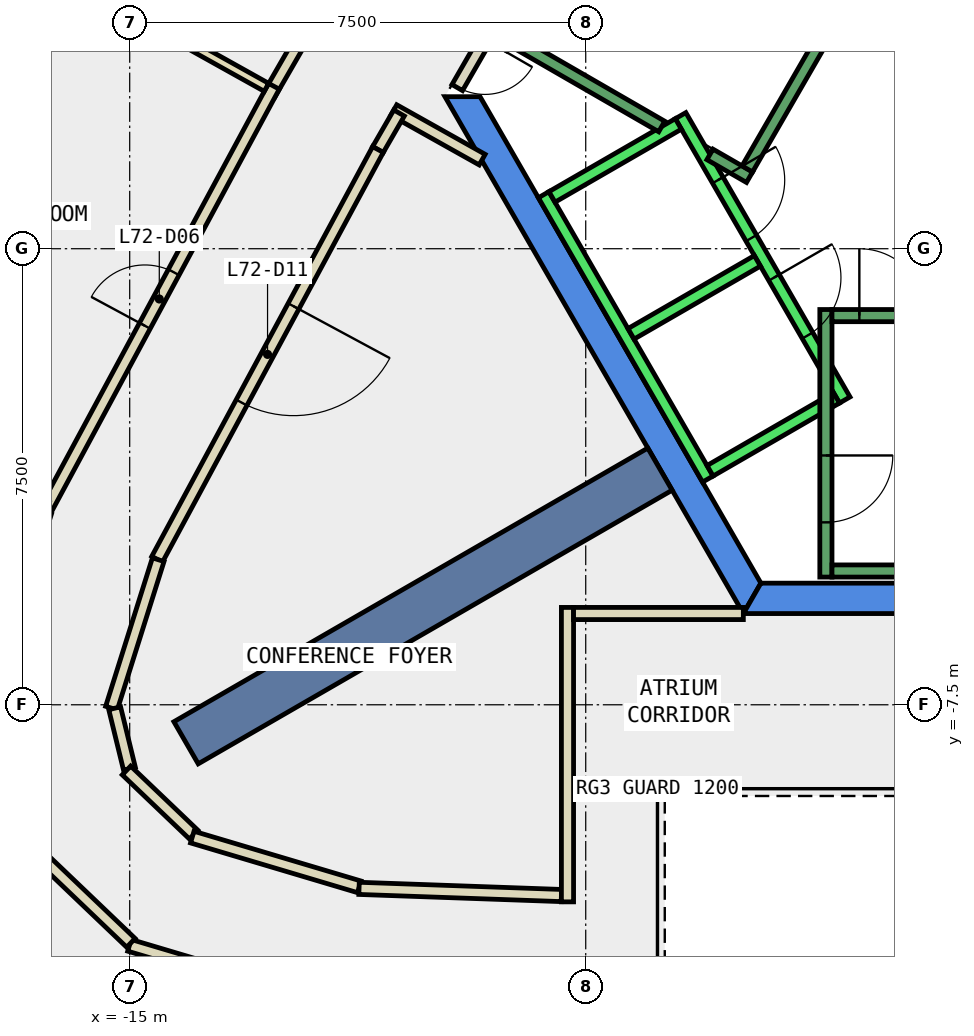
"""IFC4 building model, lengths in metres.
Left out: names, types, materials, properties, quantities, classifications, styles, units other than length and angle.
Written with IfcOpenShell. Run it as: python <this file> out.ifc"""

import sys

from ifc_helpers import new_model, si_unit, direction, frame, frame_2d, origin, place, context, subcontext, project, spatial, polyline, rectangle, outline, extrude, element, fill, save


model = new_model("IFC4")
c1 = context("Model", 3, precision=1e-05, world=origin(), true_north=direction((0.0, 1.0)))
c2 = subcontext(c1, "Body", "Model", "MODEL_VIEW")
j1 = project(units=[si_unit("LENGTHUNIT", "METRE"), si_unit("PLANEANGLEUNIT", "RADIAN")], contexts=[c1])
p1 = place(None, origin())
s1 = spatial("IfcSite", under=j1, at=p1, CompositionType="ELEMENT")
p2 = place(p1, origin())
s2 = spatial("IfcBuilding", under=s1, at=p2, CompositionType="ELEMENT")
p3 = place(p2, frame((0.0, 0.0, 308.0)))
s3 = spatial("IfcBuildingStorey", under=s2, at=p3, CompositionType="ELEMENT", Elevation=308.0)
p4 = place(p3, frame((0.0, 0.0, -0.34)))
e1 = element("IfcWall", 1, at=p4, inside=s3, PredefinedType="SHEAR", context=c2, shape_type="SweptSolid", body=[
    extrude(outline(polyline([(-9.815, 2.5), (-4.907, -6.0), (-4.619, -5.5), (-9.238, 2.5), (-9.815, 2.5)])), origin(), (0.0, 0.0, 1.0), 3.6),
])
p5 = place(p3, frame((0.0, 0.0, -0.34)))
e2 = element("IfcWall", 2, at=p5, inside=s3, PredefinedType="SHEAR", context=c2, shape_type="SweptSolid", body=[
    extrude(outline(polyline([(3.75, -6.0), (3.75, -5.5), (-4.619, -5.5), (-4.907, -6.0), (3.75, -6.0)])), origin(), (0.0, 0.0, 1.0), 3.6),
])
p6 = place(p3, frame((-6.279, -3.625, -0.34), z_axis=(0.0, 0.0, 1.0), x_axis=(-0.866017533419, -0.500013631625, 0.0)))
e3 = element("IfcWall", 3, at=p6, inside=s3, PredefinedType="SHEAR", context=c2, shape_type="SweptSolid", body=[
    extrude(rectangle(XDim=9.0, YDim=0.8, at=frame_2d((4.5, 0.0))), origin(), (0.0, 0.0, 1.0), 3.6),
])
p7 = place(p3, frame((-9.203, 1.465, 0.0), z_axis=(0.0, 0.0, 1.0), x_axis=(-0.872341127106, 0.488897696823, 0.0)))
e4 = element("IfcWall", 4, at=p7, inside=s3, PredefinedType="PARTITIONING", context=c2, shape_type="SweptSolid", body=[
    extrude(rectangle(XDim=1.667, YDim=0.2, at=frame_2d((0.833, 0.0))), origin(), (0.0, 0.0, 1.0), 3.26),
])
p8 = place(p3, frame((-10.57, 2.232, 0.0), z_axis=(0.0, 0.0, 1.0), x_axis=(-0.500037208726, -0.86600392025, 0.0)))
e5 = element("IfcWall", 5, at=p8, inside=s3, PredefinedType="PARTITIONING", context=c2, shape_type="SweptSolid", body=[
    extrude(rectangle(XDim=0.694, YDim=0.2, at=frame_2d((0.347, 0.0))), origin(), (0.0, 0.0, 1.0), 3.26),
])
p9 = place(p3, frame((-10.917, 1.631, 0.0), z_axis=(0.0, 0.0, 1.0), x_axis=(-0.47449538478, -0.880257990491, 0.0)))
e6 = element("IfcWall", 6, at=p9, inside=s3, PredefinedType="PARTITIONING", context=c2, shape_type="SweptSolid", body=[
    extrude(rectangle(XDim=7.655, YDim=0.2, at=frame_2d((3.827, 0.0))), origin(), (0.0, 0.0, 1.0), 3.26),
])
p10 = place(p9, frame((2.927, 0.0, 0.0)))
e7 = element("IfcOpeningElement", 7, at=p10, cuts=e6, PredefinedType="OPENING", context=c2, shape_type="SweptSolid", body=[
    extrude(rectangle(XDim=1.8, YDim=2.1, at=frame_2d((0.9, 1.05))), frame((0.0, 0.11, 0.0), z_axis=(0.0, -1.0, 0.0), x_axis=(1.0, 0.0, 0.0)), (0.0, 0.0, 1.0), 0.22),
])
p11 = place(p3, frame((-14.531, -5.114, 0.0), z_axis=(0.0, 0.0, 1.0), x_axis=(-0.300501248013, -0.953781421471, 0.0)))
e8 = element("IfcWall", 8, at=p11, inside=s3, PredefinedType="PARTITIONING", context=c2, shape_type="SweptSolid", body=[
    extrude(rectangle(XDim=2.559, YDim=0.2, at=frame_2d((1.28, 0.0))), origin(), (0.0, 0.0, 1.0), 3.26),
])
p12 = place(p3, frame((-15.247, -7.557, 0.0), z_axis=(0.0, 0.0, 1.0), x_axis=(0.237373129266, -0.971418549083, 0.0)))
e9 = element("IfcWall", 9, at=p12, inside=s3, PredefinedType="PARTITIONING", context=c2, shape_type="SweptSolid", body=[
    extrude(rectangle(XDim=1.024, YDim=0.2, at=frame_2d((0.512, 0.0))), origin(), (0.0, 0.0, 1.0), 3.26),
])
p13 = place(p3, frame((-15.053, -8.58, 0.0), z_axis=(0.0, 0.0, 1.0), x_axis=(0.723283043556, -0.690551691696, 0.0)))
e10 = element("IfcWall", 10, at=p13, inside=s3, PredefinedType="PARTITIONING", context=c2, shape_type="SweptSolid", body=[
    extrude(rectangle(XDim=1.529, YDim=0.2, at=frame_2d((0.765, 0.0))), origin(), (0.0, 0.0, 1.0), 3.26),
])
p14 = place(p3, frame((-13.971, -9.676, 0.0), z_axis=(0.0, 0.0, 1.0), x_axis=(0.958417413979, -0.285370041492, 0.0)))
e11 = element("IfcWall", 11, at=p14, inside=s3, PredefinedType="PARTITIONING", context=c2, shape_type="SweptSolid", body=[
    extrude(rectangle(XDim=2.866, YDim=0.2, at=frame_2d((1.433, 0.0))), origin(), (0.0, 0.0, 1.0), 3.26),
])
p15 = place(p3, frame((-11.228, -10.519, 0.0), z_axis=(0.0, 0.0, 1.0), x_axis=(0.999372900517, -0.035409119054, 0.0)))
e12 = element("IfcWall", 12, at=p15, inside=s3, PredefinedType="PARTITIONING", context=c2, shape_type="SweptSolid", body=[
    extrude(rectangle(XDim=3.33, YDim=0.2, at=frame_2d((1.665, 0.0))), origin(), (0.0, 0.0, 1.0), 3.26),
])
p16 = place(p3, frame((-12.701, 2.54, 0.0), z_axis=(0.0, 0.0, 1.0), x_axis=(0.499946799636, 0.86605611685, 0.0)))
e13 = element("IfcWall", 13, at=p16, inside=s3, PredefinedType="PARTITIONING", context=c2, shape_type="SweptSolid", body=[
    extrude(rectangle(XDim=8.227, YDim=0.2, at=frame_2d((4.114, 0.0))), origin(), (0.0, 0.0, 1.0), 3.26),
])
p17 = place(p16, frame((3.613, 0.0, 0.0)))
e14 = element("IfcOpeningElement", 14, at=p17, cuts=e13, PredefinedType="OPENING", context=c2, shape_type="SweptSolid", body=[
    extrude(rectangle(XDim=1.0, YDim=2.1, at=frame_2d((0.5, 1.05))), frame((0.0, 0.11, 0.0), z_axis=(0.0, -1.0, 0.0), x_axis=(1.0, 0.0, 0.0)), (0.0, 0.0, 1.0), 0.22),
])
p18 = place(p3, frame((-16.399, -4.325, 0.0), z_axis=(0.0, 0.0, 1.0), x_axis=(0.474489967676, 0.880260910512, 0.0)))
e15 = element("IfcWall", 15, at=p18, inside=s3, PredefinedType="PARTITIONING", context=c2, shape_type="SweptSolid", body=[
    extrude(rectangle(XDim=7.948, YDim=0.2, at=frame_2d((3.974, 0.0))), origin(), (0.0, 0.0, 1.0), 3.26),
])
p19 = place(p18, frame((3.474, 0.0, 0.0)))
e16 = element("IfcOpeningElement", 16, at=p19, cuts=e15, PredefinedType="OPENING", context=c2, shape_type="SweptSolid", body=[
    extrude(rectangle(XDim=1.0, YDim=2.1, at=frame_2d((0.5, 1.05))), frame((0.0, 0.11, 0.0), z_axis=(0.0, -1.0, 0.0), x_axis=(1.0, 0.0, 0.0)), (0.0, 0.0, 1.0), 0.22),
])
p20 = place(p3, frame((-11.55, -12.484, 0.0), z_axis=(0.0, 0.0, 1.0), x_axis=(-0.958459796003, 0.285227662485, 0.0)))
e17 = element("IfcWall", 17, at=p20, inside=s3, PredefinedType="PARTITIONING", context=c2, shape_type="SweptSolid", body=[
    extrude(rectangle(XDim=3.604, YDim=0.2, at=frame_2d((1.802, 0.0))), origin(), (0.0, 0.0, 1.0), 3.26),
])
p21 = place(p3, frame((-14.98, -11.415, 0.0), z_axis=(0.0, 0.0, 1.0), x_axis=(-0.723099256445, 0.690744138831, 0.0)))
e18 = element("IfcWall", 18, at=p21, inside=s3, PredefinedType="PARTITIONING", context=c2, shape_type="SweptSolid", body=[
    extrude(rectangle(XDim=2.596, YDim=0.2, at=frame_2d((1.298, 0.0))), origin(), (0.0, 0.0, 1.0), 3.26),
])
p22 = place(p3, frame((-2.54, 5.1, 0.0), z_axis=(0.0, 0.0, 1.0), x_axis=(0.499925051871, -0.866068670783, 0.0)))
e19 = element("IfcWall", 19, at=p22, inside=s3, PredefinedType="PARTITIONING", context=c2, shape_type="SweptSolid", body=[
    extrude(rectangle(XDim=5.181, YDim=0.2, at=frame_2d((2.59, 0.0))), origin(), (0.0, 0.0, 1.0), 3.26),
])
p23 = place(p22, frame((1.64, 0.0, 0.0)))
e20 = element("IfcOpeningElement", 20, at=p23, cuts=e19, PredefinedType="OPENING", context=c2, shape_type="SweptSolid", body=[
    extrude(rectangle(XDim=1.0, YDim=2.1, at=frame_2d((0.5, 1.05))), frame((0.0, 0.11, 0.0), z_axis=(0.0, -1.0, 0.0), x_axis=(1.0, 0.0, 0.0)), (0.0, 0.0, 1.0), 0.22),
])
p24 = place(p3, frame((-7.8, -10.741, 0.0), z_axis=(0.0, 0.0, 1.0), x_axis=(0.0, 1.0, 0.0)))
e21 = element("IfcWall", 21, at=p24, inside=s3, PredefinedType="PARTITIONING", context=c2, shape_type="SweptSolid", body=[
    extrude(rectangle(XDim=4.842, YDim=0.2, at=frame_2d((2.421, 0.0))), origin(), (0.0, 0.0, 1.0), 3.26),
])
p25 = place(p3, frame((-7.7, -5.999, 0.0), z_axis=(0.0, 0.0, 1.0), x_axis=(1.0, 0.0, 0.0)))
e22 = element("IfcWall", 22, at=p25, inside=s3, PredefinedType="PARTITIONING", context=c2, shape_type="SweptSolid", body=[
    extrude(rectangle(XDim=2.792, YDim=0.2, at=frame_2d((1.396, 0.0))), origin(), (0.0, 0.0, 1.0), 3.26),
])
p26 = place(p3, frame((-12.751, 2.654, 0.0), z_axis=(0.0, 0.0, 1.0), x_axis=(-0.873277679945, 0.487222837837, 0.0)))
e23 = element("IfcWall", 23, at=p26, inside=s3, PredefinedType="PARTITIONING", context=c2, shape_type="SweptSolid", body=[
    extrude(rectangle(XDim=4.38, YDim=0.15, at=frame_2d((2.19, 0.0))), origin(), (0.0, 0.0, 1.0), 3.26),
])
p27 = place(p3, frame((-9.15, 3.452, 0.0), z_axis=(0.0, 0.0, 1.0), x_axis=(-0.500079945886, -0.865979242085, 0.0)))
e24 = element("IfcWall", 24, at=p27, inside=s3, PredefinedType="PARTITIONING", context=c2, shape_type="SweptSolid", body=[
    extrude(rectangle(XDim=0.926, YDim=0.2, at=frame_2d((0.463, 0.0))), origin(), (0.0, 0.0, 1.0), 2.4),
])
p28 = place(p27, frame((0.017, 0.0, 0.0)))
e25 = element("IfcOpeningElement", 25, at=p28, cuts=e24, PredefinedType="OPENING", context=c2, shape_type="SweptSolid", body=[
    extrude(rectangle(XDim=0.9, YDim=2.1, at=frame_2d((0.45, 1.05))), frame((0.0, 0.11, 0.0), z_axis=(0.0, -1.0, 0.0), x_axis=(1.0, 0.0, 0.0)), (0.0, 0.0, 1.0), 0.22),
])
p29 = place(p3, frame((-5.94, 2.188, 0.0), z_axis=(0.0, 0.0, 1.0), x_axis=(0.500034260056, -0.866005622828, 0.0)))
e26 = element("IfcWall", 26, at=p29, inside=s3, PredefinedType="STANDARD", context=c2, shape_type="SweptSolid", body=[
    extrude(rectangle(XDim=5.399, YDim=0.2, at=frame_2d((2.7, 0.0))), origin(), (0.0, 0.0, 1.0), 3.26),
])
p30 = place(p29, frame((3.075, 0.0, 0.0)))
e27 = element("IfcOpeningElement", 27, at=p30, cuts=e26, PredefinedType="OPENING", context=c2, shape_type="SweptSolid", body=[
    extrude(rectangle(XDim=1.1, YDim=2.1, at=frame_2d((0.55, 1.05))), frame((0.0, 0.11, 0.0), z_axis=(0.0, -1.0, 0.0), x_axis=(1.0, 0.0, 0.0)), (0.0, 0.0, 1.0), 0.22),
])
p31 = place(p29, frame((1.225, 0.0, 0.0)))
e28 = element("IfcOpeningElement", 28, at=p31, cuts=e26, PredefinedType="OPENING", context=c2, shape_type="SweptSolid", body=[
    extrude(rectangle(XDim=1.1, YDim=2.1, at=frame_2d((0.55, 1.05))), frame((0.0, 0.11, 0.0), z_axis=(0.0, -1.0, 0.0), x_axis=(1.0, 0.0, 0.0)), (0.0, 0.0, 1.0), 0.22),
])
p32 = place(p3, frame((-8.192, 0.888, 0.0), z_axis=(0.0, 0.0, 1.0), x_axis=(0.500034260056, -0.866005622828, 0.0)))
e29 = element("IfcWall", 29, at=p32, inside=s3, PredefinedType="STANDARD", context=c2, shape_type="SweptSolid", body=[
    extrude(rectangle(XDim=5.399, YDim=0.2, at=frame_2d((2.7, 0.0))), origin(), (0.0, 0.0, 1.0), 3.26),
])
for number, where, z_axis, x_axis in (
    (30, (-5.977, 2.052, 0.0), (0.0, 0.0, 1.0), (-0.866, -0.5, 0.0)),
    (31, (-4.677, -0.2, 0.0), (0.0, 0.0, 1.0), (-0.866, -0.5, 0.0)),
):
    element("IfcWall", number, at=place(p3, frame(where, z_axis=z_axis, x_axis=x_axis)), inside=s3, PredefinedType="STANDARD", context=c2, shape_type="SweptSolid", body=[
        extrude(rectangle(XDim=2.399, YDim=0.2, at=frame_2d((1.2, 0.0))), origin(), (0.0, 0.0, 1.0), 3.26),
    ])
p33 = place(p3, frame((-3.377, -2.452, 0.0), z_axis=(0.0, 0.0, 1.0), x_axis=(-0.865955154139, -0.50012165622, 0.0)))
e32 = element("IfcWall", 32, at=p33, inside=s3, PredefinedType="STANDARD", context=c2, shape_type="SweptSolid", body=[
    extrude(rectangle(XDim=2.4, YDim=0.2, at=frame_2d((1.2, 0.0))), origin(), (0.0, 0.0, 1.0), 3.26),
])
p34 = place(p3, frame((-3.55, -1.0, 0.0), z_axis=(0.0, 0.0, 1.0), x_axis=(0.0, -1.0, 0.0)))
e33 = element("IfcWall", 33, at=p34, inside=s3, PredefinedType="STANDARD", context=c2, shape_type="SweptSolid", body=[
    extrude(rectangle(XDim=4.4, YDim=0.2, at=frame_2d((2.2, 0.0))), origin(), (0.0, 0.0, 1.0), 3.26),
])
p35 = place(p34, frame((2.4, 0.0, 0.0)))
e34 = element("IfcOpeningElement", 34, at=p35, cuts=e33, PredefinedType="OPENING", context=c2, shape_type="SweptSolid", body=[
    extrude(rectangle(XDim=1.1, YDim=2.2, at=frame_2d((0.55, 1.1))), frame((0.0, 0.11, 0.0), z_axis=(0.0, -1.0, 0.0), x_axis=(1.0, 0.0, 0.0)), (0.0, 0.0, 1.0), 0.22),
])
p36 = place(p3, frame((-3.45, -1.1, 0.0), z_axis=(0.0, 0.0, 1.0), x_axis=(1.0, 0.0, 0.0)))
e35 = element("IfcWall", 35, at=p36, inside=s3, PredefinedType="STANDARD", context=c2, shape_type="SweptSolid", body=[
    extrude(rectangle(XDim=6.9, YDim=0.2, at=frame_2d((3.45, 0.0))), origin(), (0.0, 0.0, 1.0), 3.26),
])
p37 = place(p36, frame((0.45, 0.0, 0.0)))
e36 = element("IfcOpeningElement", 36, at=p37, cuts=e35, PredefinedType="OPENING", context=c2, shape_type="SweptSolid", body=[
    extrude(rectangle(XDim=1.1, YDim=2.2, at=frame_2d((0.55, 1.1))), frame((0.0, 0.11, 0.0), z_axis=(0.0, -1.0, 0.0), x_axis=(1.0, 0.0, 0.0)), (0.0, 0.0, 1.0), 0.22),
])
p38 = place(p3, frame((-3.45, -5.3, 0.0), z_axis=(0.0, 0.0, 1.0), x_axis=(1.0, 0.0, 0.0)))
e37 = element("IfcWall", 37, at=p38, inside=s3, PredefinedType="STANDARD", context=c2, shape_type="SweptSolid", body=[
    extrude(rectangle(XDim=6.9, YDim=0.2, at=frame_2d((3.45, 0.0))), origin(), (0.0, 0.0, 1.0), 3.26),
])
p39 = place(p3, frame((-6.25, 2.01, 0.0), z_axis=(0.0, 0.0, 1.0), x_axis=(-0.86611865017, 0.499838457731, 0.0)))
e38 = element("IfcWall", 38, at=p39, inside=s3, PredefinedType="STANDARD", context=c2, shape_type="SweptSolid", body=[
    extrude(rectangle(XDim=2.733, YDim=0.2, at=frame_2d((1.366, 0.0))), origin(), (0.0, 0.0, 1.0), 3.26),
])
p40 = place(p3, frame((-4.806, 1.176, 0.0), z_axis=(0.0, 0.0, 1.0), x_axis=(-0.866558586415, 0.499075361355, 0.0)))
e39 = element("IfcWall", 39, at=p40, inside=s3, PredefinedType="STANDARD", context=c2, shape_type="SweptSolid", body=[
    extrude(rectangle(XDim=0.751, YDim=0.2, at=frame_2d((0.376, 0.0))), origin(), (0.0, 0.0, 1.0), 3.26),
])
p41 = place(p3, frame((-1.393, 7.288, 0.0), z_axis=(0.0, 0.0, 1.0), x_axis=(-0.499963383562, -0.866046543262, 0.0)))
e40 = element("IfcWall", 40, at=p41, inside=s3, PredefinedType="STANDARD", context=c2, shape_type="SweptSolid", body=[
    extrude(rectangle(XDim=6.9, YDim=0.2, at=frame_2d((3.45, 0.0))), origin(), (0.0, 0.0, 1.0), 3.26),
])
p42 = place(p41, frame((0.45, 0.0, 0.0)))
e41 = element("IfcOpeningElement", 41, at=p42, cuts=e40, PredefinedType="OPENING", context=c2, shape_type="SweptSolid", body=[
    extrude(rectangle(XDim=1.1, YDim=2.2, at=frame_2d((0.55, 1.1))), frame((0.0, 0.11, 0.0), z_axis=(0.0, -1.0, 0.0), x_axis=(1.0, 0.0, 0.0)), (0.0, 0.0, 1.0), 0.22),
])
p43 = place(p19, origin())
e42 = element("IfcDoor", 42, at=p43, inside=s3, OperationType="SINGLE_SWING_LEFT", PredefinedType="DOOR", context=c2, shape_type="SweptSolid", body=[
    extrude(rectangle(XDim=1.0, YDim=2.1, at=frame_2d((0.5, 1.05))), frame((0.0, 0.025, 0.0), z_axis=(0.0, -1.0, 0.0), x_axis=(1.0, 0.0, 0.0)), (0.0, 0.0, 1.0), 0.05),
])
fill(e16, e42)
p44 = place(p10, origin())
e43 = element("IfcDoor", 43, at=p44, inside=s3, OperationType="DOUBLE_DOOR_SINGLE_SWING", PredefinedType="DOOR", context=c2, shape_type="SweptSolid", body=[
    extrude(rectangle(XDim=1.8, YDim=2.1, at=frame_2d((0.9, 1.05))), frame((0.0, 0.025, 0.0), z_axis=(0.0, -1.0, 0.0), x_axis=(1.0, 0.0, 0.0)), (0.0, 0.0, 1.0), 0.05),
])
fill(e7, e43)
p45 = place(p28, origin())
e44 = element("IfcDoor", 44, at=p45, inside=s3, OperationType="SINGLE_SWING_LEFT", PredefinedType="DOOR", context=c2, shape_type="SweptSolid", body=[
    extrude(rectangle(XDim=0.9, YDim=2.1, at=frame_2d((0.45, 1.05))), frame((0.0, 0.025, 0.0), z_axis=(0.0, -1.0, 0.0), x_axis=(1.0, 0.0, 0.0)), (0.0, 0.0, 1.0), 0.05),
])
fill(e25, e44)
p46 = place(p30, origin())
e45 = element("IfcDoor", 45, at=p46, inside=s3, OperationType="SLIDING_TO_LEFT", PredefinedType="DOOR", context=c2, shape_type="SweptSolid", body=[
    extrude(rectangle(XDim=1.1, YDim=2.1, at=frame_2d((0.55, 1.05))), frame((0.0, 0.025, 0.0), z_axis=(0.0, -1.0, 0.0), x_axis=(1.0, 0.0, 0.0)), (0.0, 0.0, 1.0), 0.05),
])
fill(e27, e45)
p47 = place(p31, origin())
e46 = element("IfcDoor", 46, at=p47, inside=s3, OperationType="SLIDING_TO_LEFT", PredefinedType="DOOR", context=c2, shape_type="SweptSolid", body=[
    extrude(rectangle(XDim=1.1, YDim=2.1, at=frame_2d((0.55, 1.05))), frame((0.0, 0.025, 0.0), z_axis=(0.0, -1.0, 0.0), x_axis=(1.0, 0.0, 0.0)), (0.0, 0.0, 1.0), 0.05),
])
fill(e28, e46)
p48 = place(p37, origin())
e47 = element("IfcDoor", 47, at=p48, inside=s3, OperationType="SINGLE_SWING_LEFT", PredefinedType="DOOR", context=c2, shape_type="SweptSolid", body=[
    extrude(rectangle(XDim=1.1, YDim=2.2, at=frame_2d((0.55, 1.1))), frame((0.0, 0.025, 0.0), z_axis=(0.0, -1.0, 0.0), x_axis=(1.0, 0.0, 0.0)), (0.0, 0.0, 1.0), 0.05),
])
fill(e36, e47)
p49 = place(p35, origin())
e48 = element("IfcDoor", 48, at=p49, inside=s3, OperationType="SINGLE_SWING_LEFT", PredefinedType="DOOR", context=c2, shape_type="SweptSolid", body=[
    extrude(rectangle(XDim=1.1, YDim=2.2, at=frame_2d((0.55, 1.1))), frame((0.0, 0.025, 0.0), z_axis=(0.0, -1.0, 0.0), x_axis=(1.0, 0.0, 0.0)), (0.0, 0.0, 1.0), 0.05),
])
fill(e34, e48)
save(model, sys.argv[1])
